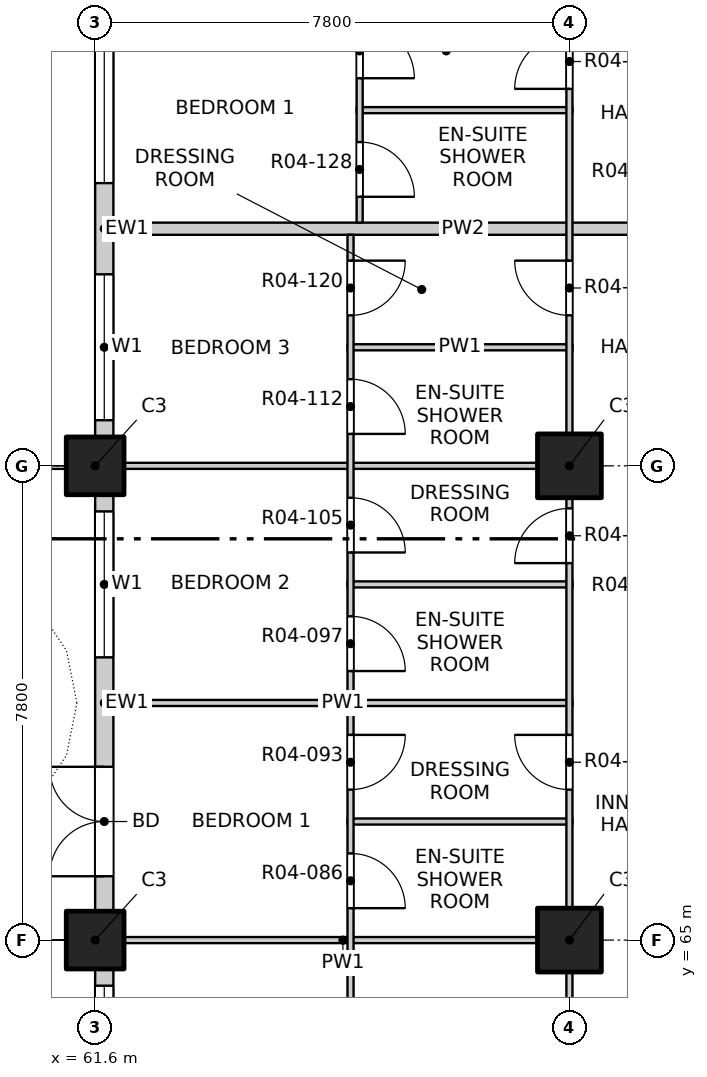
"""IFC4 building model, lengths in metres.
Left out: names, types, materials, properties, quantities, classifications, styles, units other than length and angle.
Written with IfcOpenShell. Run it as: python <this file> out.ifc"""

import sys

from ifc_helpers import new_model, si_unit, direction, frame, frame_2d, origin, origin_2d, place, context, subcontext, project, spatial, rectangle, extrude, element, fill, save


model = new_model("IFC4")
c1 = context("Model", 3, precision=1e-05, world=origin(), true_north=direction((0.0, 1.0)))
c2 = subcontext(c1, "Body", "Model", "MODEL_VIEW")
j1 = project(units=[si_unit("LENGTHUNIT", "METRE"), si_unit("PLANEANGLEUNIT", "RADIAN")], contexts=[c1])
p1 = place(None, origin())
s1 = spatial("IfcSite", under=j1, at=p1, CompositionType="ELEMENT")
p2 = place(p1, origin())
s2 = spatial("IfcBuilding", under=s1, at=p2, CompositionType="ELEMENT")
p3 = place(p2, frame((0.0, 0.0, 58.0)))
s3 = spatial("IfcBuildingStorey", under=s2, at=p3, CompositionType="ELEMENT", Elevation=58.0)
for number, where, z_axis, x_axis in (
    (1, (61.6, 65.0, -0.25), (0.0, 0.0, 1.0), (1.0, 0.0, 0.0)),
    (2, (61.6, 72.8, -0.25), (0.0, 0.0, 1.0), (1.0, 0.0, 0.0)),
):
    element("IfcColumn", number, at=place(p3, frame(where, z_axis=z_axis, x_axis=x_axis)), inside=s3, PredefinedType="COLUMN", context=c2, shape_type="SweptSolid", body=[
        extrude(rectangle(XDim=0.95, YDim=0.95, at=origin_2d()), origin(), (0.0, 0.0, 1.0), 3.4),
    ])
for number, where, z_axis, x_axis in (
    (3, (69.4, 65.0, -0.25), (0.0, 0.0, 1.0), (1.0, 0.0, 0.0)),
    (4, (69.4, 72.8, -0.25), (0.0, 0.0, 1.0), (1.0, 0.0, 0.0)),
):
    element("IfcColumn", number, at=place(p3, frame(where, z_axis=z_axis, x_axis=x_axis)), inside=s3, PredefinedType="COLUMN", context=c2, shape_type="SweptSolid", body=[
        extrude(rectangle(XDim=1.05, YDim=1.05, at=origin_2d()), origin(), (0.0, 0.0, 1.0), 3.4),
    ])
p4 = place(p3, frame((61.75, 57.675, 0.0), z_axis=(0.0, 0.0, 1.0), x_axis=(0.0, 1.0, 0.0)))
e5 = element("IfcWall", 5, at=p4, inside=s3, PredefinedType="SOLIDWALL", context=c2, shape_type="SweptSolid", body=[
    extrude(rectangle(XDim=6.85, YDim=0.3, at=frame_2d((3.425, 0.0))), origin(), (0.0, 0.0, 1.0), 2.7),
])
p5 = place(p4, frame((0.575, 0.0, 0.0)))
e6 = element("IfcOpeningElement", 6, at=p5, cuts=e5, PredefinedType="OPENING", context=c2, shape_type="SweptSolid", body=[
    extrude(rectangle(XDim=1.8, YDim=2.4, at=frame_2d((0.9, 1.2))), frame((0.0, 0.16, 0.0), z_axis=(0.0, -1.0, 0.0), x_axis=(1.0, 0.0, 0.0)), (0.0, 0.0, 1.0), 0.32),
])
p6 = place(p4, frame((4.175, 0.0, 0.9)))
e7 = element("IfcOpeningElement", 7, at=p6, cuts=e5, PredefinedType="OPENING", context=c2, shape_type="SweptSolid", body=[
    extrude(rectangle(XDim=2.4, YDim=1.8, at=frame_2d((1.2, 0.9))), frame((0.0, 0.16, 0.0), z_axis=(0.0, -1.0, 0.0), x_axis=(1.0, 0.0, 0.0)), (0.0, 0.0, 1.0), 0.32),
])
p7 = place(p3, frame((61.75, 65.475, 0.0), z_axis=(0.0, 0.0, 1.0), x_axis=(0.0, 1.0, 0.0)))
e8 = element("IfcWall", 8, at=p7, inside=s3, PredefinedType="SOLIDWALL", context=c2, shape_type="SweptSolid", body=[
    extrude(rectangle(XDim=6.85, YDim=0.3, at=frame_2d((3.425, 0.0))), origin(), (0.0, 0.0, 1.0), 2.7),
])
p8 = place(p7, frame((0.575, 0.0, 0.0)))
e9 = element("IfcOpeningElement", 9, at=p8, cuts=e8, PredefinedType="OPENING", context=c2, shape_type="SweptSolid", body=[
    extrude(rectangle(XDim=1.8, YDim=2.4, at=frame_2d((0.9, 1.2))), frame((0.0, 0.16, 0.0), z_axis=(0.0, -1.0, 0.0), x_axis=(1.0, 0.0, 0.0)), (0.0, 0.0, 1.0), 0.32),
])
p9 = place(p7, frame((4.175, 0.0, 0.9)))
e10 = element("IfcOpeningElement", 10, at=p9, cuts=e8, PredefinedType="OPENING", context=c2, shape_type="SweptSolid", body=[
    extrude(rectangle(XDim=2.4, YDim=1.8, at=frame_2d((1.2, 0.9))), frame((0.0, 0.16, 0.0), z_axis=(0.0, -1.0, 0.0), x_axis=(1.0, 0.0, 0.0)), (0.0, 0.0, 1.0), 0.32),
])
p10 = place(p3, frame((61.75, 73.275, 0.0), z_axis=(0.0, 0.0, 1.0), x_axis=(0.0, 1.0, 0.0)))
e11 = element("IfcWall", 11, at=p10, inside=s3, PredefinedType="SOLIDWALL", context=c2, shape_type="SweptSolid", body=[
    extrude(rectangle(XDim=6.85, YDim=0.3, at=frame_2d((3.425, 0.0))), origin(), (0.0, 0.0, 1.0), 2.7),
])
p11 = place(p10, frame((0.275, 0.0, 0.9)))
e12 = element("IfcOpeningElement", 12, at=p11, cuts=e11, PredefinedType="OPENING", context=c2, shape_type="SweptSolid", body=[
    extrude(rectangle(XDim=2.4, YDim=1.8, at=frame_2d((1.2, 0.9))), frame((0.0, 0.16, 0.0), z_axis=(0.0, -1.0, 0.0), x_axis=(1.0, 0.0, 0.0)), (0.0, 0.0, 1.0), 0.32),
])
p12 = place(p10, frame((4.175, 0.0, 0.9)))
e13 = element("IfcOpeningElement", 13, at=p12, cuts=e11, PredefinedType="OPENING", context=c2, shape_type="SweptSolid", body=[
    extrude(rectangle(XDim=2.4, YDim=1.8, at=frame_2d((1.2, 0.9))), frame((0.0, 0.16, 0.0), z_axis=(0.0, -1.0, 0.0), x_axis=(1.0, 0.0, 0.0)), (0.0, 0.0, 1.0), 0.32),
])
p13 = place(p3, frame((61.9, 65.0, 0.0), z_axis=(0.0, 0.0, 1.0), x_axis=(1.0, 0.0, 0.0)))
e14 = element("IfcWall", 14, at=p13, inside=s3, PredefinedType="PARTITIONING", context=c2, shape_type="SweptSolid", body=[
    extrude(rectangle(XDim=7.55, YDim=0.1, at=frame_2d((3.775, 0.0))), origin(), (0.0, 0.0, 1.0), 2.55),
])
p14 = place(p3, frame((65.75, 66.95, 0.0), z_axis=(0.0, 0.0, 1.0), x_axis=(1.0, 0.0, 0.0)))
e15 = element("IfcWall", 15, at=p14, inside=s3, PredefinedType="PARTITIONING", context=c2, shape_type="SweptSolid", body=[
    extrude(rectangle(XDim=3.7, YDim=0.1, at=frame_2d((1.85, 0.0))), origin(), (0.0, 0.0, 1.0), 3.15),
])
p15 = place(p3, frame((61.9, 68.9, 0.0), z_axis=(0.0, 0.0, 1.0), x_axis=(1.0, 0.0, 0.0)))
e16 = element("IfcWall", 16, at=p15, inside=s3, PredefinedType="PARTITIONING", context=c2, shape_type="SweptSolid", body=[
    extrude(rectangle(XDim=7.55, YDim=0.1, at=frame_2d((3.775, 0.0))), origin(), (0.0, 0.0, 1.0), 3.15),
])
p16 = place(p3, frame((65.75, 70.85, 0.0), z_axis=(0.0, 0.0, 1.0), x_axis=(1.0, 0.0, 0.0)))
e17 = element("IfcWall", 17, at=p16, inside=s3, PredefinedType="PARTITIONING", context=c2, shape_type="SweptSolid", body=[
    extrude(rectangle(XDim=3.7, YDim=0.1, at=frame_2d((1.85, 0.0))), origin(), (0.0, 0.0, 1.0), 3.15),
])
p17 = place(p3, frame((61.9, 72.8, 0.0), z_axis=(0.0, 0.0, 1.0), x_axis=(1.0, 0.0, 0.0)))
e18 = element("IfcWall", 18, at=p17, inside=s3, PredefinedType="PARTITIONING", context=c2, shape_type="SweptSolid", body=[
    extrude(rectangle(XDim=7.55, YDim=0.1, at=frame_2d((3.775, 0.0))), origin(), (0.0, 0.0, 1.0), 2.55),
])
p18 = place(p3, frame((65.75, 74.75, 0.0), z_axis=(0.0, 0.0, 1.0), x_axis=(1.0, 0.0, 0.0)))
e19 = element("IfcWall", 19, at=p18, inside=s3, PredefinedType="PARTITIONING", context=c2, shape_type="SweptSolid", body=[
    extrude(rectangle(XDim=3.7, YDim=0.1, at=frame_2d((1.85, 0.0))), origin(), (0.0, 0.0, 1.0), 3.15),
])
p19 = place(p3, frame((61.9, 76.7, 0.0), z_axis=(0.0, 0.0, 1.0), x_axis=(1.0, 0.0, 0.0)))
e20 = element("IfcWall", 20, at=p19, inside=s3, PredefinedType="PARTITIONING", context=c2, shape_type="SweptSolid", body=[
    extrude(rectangle(XDim=11.5, YDim=0.2, at=frame_2d((5.75, 0.0))), origin(), (0.0, 0.0, 1.0), 3.15),
])
p20 = place(p3, frame((65.9, 78.65, 0.0), z_axis=(0.0, 0.0, 1.0), x_axis=(1.0, 0.0, 0.0)))
e21 = element("IfcWall", 21, at=p20, inside=s3, PredefinedType="PARTITIONING", context=c2, shape_type="SweptSolid", body=[
    extrude(rectangle(XDim=3.55, YDim=0.1, at=frame_2d((1.775, 0.0))), origin(), (0.0, 0.0, 1.0), 3.15),
])
p21 = place(p3, frame((65.8, 61.2, 0.0), z_axis=(0.0, 0.0, 1.0), x_axis=(0.0, 1.0, 0.0)))
e22 = element("IfcWall", 22, at=p21, inside=s3, PredefinedType="PARTITIONING", context=c2, shape_type="SweptSolid", body=[
    extrude(rectangle(XDim=15.4, YDim=0.1, at=frame_2d((7.7, 0.0))), origin(), (0.0, 0.0, 1.0), 3.15),
])
p22 = place(p21, frame((1.25, 0.0, 0.0)))
e23 = element("IfcOpeningElement", 23, at=p22, cuts=e22, PredefinedType="OPENING", context=c2, shape_type="SweptSolid", body=[
    extrude(rectangle(XDim=1.2, YDim=2.1, at=frame_2d((0.6, 1.05))), frame((0.0, 0.06, 0.0), z_axis=(0.0, -1.0, 0.0), x_axis=(1.0, 0.0, 0.0)), (0.0, 0.0, 1.0), 0.12),
])
p23 = place(p21, frame((4.325, 0.0, 0.0)))
e24 = element("IfcOpeningElement", 24, at=p23, cuts=e22, PredefinedType="OPENING", context=c2, shape_type="SweptSolid", body=[
    extrude(rectangle(XDim=0.9, YDim=2.1, at=frame_2d((0.45, 1.05))), frame((0.0, 0.06, 0.0), z_axis=(0.0, -1.0, 0.0), x_axis=(1.0, 0.0, 0.0)), (0.0, 0.0, 1.0), 0.12),
])
p24 = place(p21, frame((6.275, 0.0, 0.0)))
e25 = element("IfcOpeningElement", 25, at=p24, cuts=e22, PredefinedType="OPENING", context=c2, shape_type="SweptSolid", body=[
    extrude(rectangle(XDim=0.9, YDim=2.1, at=frame_2d((0.45, 1.05))), frame((0.0, 0.06, 0.0), z_axis=(0.0, -1.0, 0.0), x_axis=(1.0, 0.0, 0.0)), (0.0, 0.0, 1.0), 0.12),
])
p25 = place(p21, frame((8.225, 0.0, 0.0)))
e26 = element("IfcOpeningElement", 26, at=p25, cuts=e22, PredefinedType="OPENING", context=c2, shape_type="SweptSolid", body=[
    extrude(rectangle(XDim=0.9, YDim=2.1, at=frame_2d((0.45, 1.05))), frame((0.0, 0.06, 0.0), z_axis=(0.0, -1.0, 0.0), x_axis=(1.0, 0.0, 0.0)), (0.0, 0.0, 1.0), 0.12),
])
p26 = place(p21, frame((10.175, 0.0, 0.0)))
e27 = element("IfcOpeningElement", 27, at=p26, cuts=e22, PredefinedType="OPENING", context=c2, shape_type="SweptSolid", body=[
    extrude(rectangle(XDim=0.9, YDim=2.1, at=frame_2d((0.45, 1.05))), frame((0.0, 0.06, 0.0), z_axis=(0.0, -1.0, 0.0), x_axis=(1.0, 0.0, 0.0)), (0.0, 0.0, 1.0), 0.12),
])
p27 = place(p21, frame((12.125, 0.0, 0.0)))
e28 = element("IfcOpeningElement", 28, at=p27, cuts=e22, PredefinedType="OPENING", context=c2, shape_type="SweptSolid", body=[
    extrude(rectangle(XDim=0.9, YDim=2.1, at=frame_2d((0.45, 1.05))), frame((0.0, 0.06, 0.0), z_axis=(0.0, -1.0, 0.0), x_axis=(1.0, 0.0, 0.0)), (0.0, 0.0, 1.0), 0.12),
])
p28 = place(p21, frame((14.075, 0.0, 0.0)))
e29 = element("IfcOpeningElement", 29, at=p28, cuts=e22, PredefinedType="OPENING", context=c2, shape_type="SweptSolid", body=[
    extrude(rectangle(XDim=0.9, YDim=2.1, at=frame_2d((0.45, 1.05))), frame((0.0, 0.06, 0.0), z_axis=(0.0, -1.0, 0.0), x_axis=(1.0, 0.0, 0.0)), (0.0, 0.0, 1.0), 0.12),
])
p29 = place(p3, frame((65.95, 76.8, 0.0), z_axis=(0.0, 0.0, 1.0), x_axis=(0.0, 1.0, 0.0)))
e30 = element("IfcWall", 30, at=p29, inside=s3, PredefinedType="PARTITIONING", context=c2, shape_type="SweptSolid", body=[
    extrude(rectangle(XDim=11.3, YDim=0.1, at=frame_2d((5.65, 0.0))), origin(), (0.0, 0.0, 1.0), 3.15),
])
p30 = place(p29, frame((0.425, 0.0, 0.0)))
e31 = element("IfcOpeningElement", 31, at=p30, cuts=e30, PredefinedType="OPENING", context=c2, shape_type="SweptSolid", body=[
    extrude(rectangle(XDim=0.9, YDim=2.1, at=frame_2d((0.45, 1.05))), frame((0.0, 0.06, 0.0), z_axis=(0.0, -1.0, 0.0), x_axis=(1.0, 0.0, 0.0)), (0.0, 0.0, 1.0), 0.12),
])
p31 = place(p29, frame((2.375, 0.0, 0.0)))
e32 = element("IfcOpeningElement", 32, at=p31, cuts=e30, PredefinedType="OPENING", context=c2, shape_type="SweptSolid", body=[
    extrude(rectangle(XDim=0.9, YDim=2.1, at=frame_2d((0.45, 1.05))), frame((0.0, 0.06, 0.0), z_axis=(0.0, -1.0, 0.0), x_axis=(1.0, 0.0, 0.0)), (0.0, 0.0, 1.0), 0.12),
])
p32 = place(p29, frame((5.15, 0.0, 0.0)))
e33 = element("IfcOpeningElement", 33, at=p32, cuts=e30, PredefinedType="OPENING", context=c2, shape_type="SweptSolid", body=[
    extrude(rectangle(XDim=1.2, YDim=2.1, at=frame_2d((0.6, 1.05))), frame((0.0, 0.06, 0.0), z_axis=(0.0, -1.0, 0.0), x_axis=(1.0, 0.0, 0.0)), (0.0, 0.0, 1.0), 0.12),
])
p33 = place(p29, frame((9.05, 0.0, 0.0)))
e34 = element("IfcOpeningElement", 34, at=p33, cuts=e30, PredefinedType="OPENING", context=c2, shape_type="SweptSolid", body=[
    extrude(rectangle(XDim=1.2, YDim=2.1, at=frame_2d((0.6, 1.05))), frame((0.0, 0.06, 0.0), z_axis=(0.0, -1.0, 0.0), x_axis=(1.0, 0.0, 0.0)), (0.0, 0.0, 1.0), 0.12),
])
p34 = place(p3, frame((69.4, 49.4, 0.0), z_axis=(0.0, 0.0, 1.0), x_axis=(0.0, 1.0, 0.0)))
e35 = element("IfcWall", 35, at=p34, inside=s3, PredefinedType="PARTITIONING", context=c2, shape_type="SweptSolid", body=[
    extrude(rectangle(XDim=31.2, YDim=0.1, at=frame_2d((15.6, 0.0))), origin(), (0.0, 0.0, 1.0), 3.15),
])
p35 = place(p34, frame((2.475, 0.0, 0.0)))
e36 = element("IfcOpeningElement", 36, at=p35, cuts=e35, PredefinedType="OPENING", context=c2, shape_type="SweptSolid", body=[
    extrude(rectangle(XDim=0.9, YDim=2.1, at=frame_2d((0.45, 1.05))), frame((0.0, 0.06, 0.0), z_axis=(0.0, -1.0, 0.0), x_axis=(1.0, 0.0, 0.0)), (0.0, 0.0, 1.0), 0.12),
])
p36 = place(p34, frame((5.4, 0.0, 0.0)))
e37 = element("IfcOpeningElement", 37, at=p36, cuts=e35, PredefinedType="OPENING", context=c2, shape_type="SweptSolid", body=[
    extrude(rectangle(XDim=0.9, YDim=2.1, at=frame_2d((0.45, 1.05))), frame((0.0, 0.06, 0.0), z_axis=(0.0, -1.0, 0.0), x_axis=(1.0, 0.0, 0.0)), (0.0, 0.0, 1.0), 0.12),
])
p37 = place(p34, frame((10.275, 0.0, 0.0)))
e38 = element("IfcOpeningElement", 38, at=p37, cuts=e35, PredefinedType="OPENING", context=c2, shape_type="SweptSolid", body=[
    extrude(rectangle(XDim=0.9, YDim=2.1, at=frame_2d((0.45, 1.05))), frame((0.0, 0.06, 0.0), z_axis=(0.0, -1.0, 0.0), x_axis=(1.0, 0.0, 0.0)), (0.0, 0.0, 1.0), 0.12),
])
p38 = place(p34, frame((13.2, 0.0, 0.0)))
e39 = element("IfcOpeningElement", 39, at=p38, cuts=e35, PredefinedType="OPENING", context=c2, shape_type="SweptSolid", body=[
    extrude(rectangle(XDim=0.9, YDim=2.1, at=frame_2d((0.45, 1.05))), frame((0.0, 0.06, 0.0), z_axis=(0.0, -1.0, 0.0), x_axis=(1.0, 0.0, 0.0)), (0.0, 0.0, 1.0), 0.12),
])
p39 = place(p34, frame((18.075, 0.0, 0.0)))
e40 = element("IfcOpeningElement", 40, at=p39, cuts=e35, PredefinedType="OPENING", context=c2, shape_type="SweptSolid", body=[
    extrude(rectangle(XDim=0.9, YDim=2.1, at=frame_2d((0.45, 1.05))), frame((0.0, 0.06, 0.0), z_axis=(0.0, -1.0, 0.0), x_axis=(1.0, 0.0, 0.0)), (0.0, 0.0, 1.0), 0.12),
])
p40 = place(p34, frame((21.8, 0.0, 0.0)))
e41 = element("IfcOpeningElement", 41, at=p40, cuts=e35, PredefinedType="OPENING", context=c2, shape_type="SweptSolid", body=[
    extrude(rectangle(XDim=0.9, YDim=2.1, at=frame_2d((0.45, 1.05))), frame((0.0, 0.06, 0.0), z_axis=(0.0, -1.0, 0.0), x_axis=(1.0, 0.0, 0.0)), (0.0, 0.0, 1.0), 0.12),
])
p41 = place(p34, frame((25.875, 0.0, 0.0)))
e42 = element("IfcOpeningElement", 42, at=p41, cuts=e35, PredefinedType="OPENING", context=c2, shape_type="SweptSolid", body=[
    extrude(rectangle(XDim=0.9, YDim=2.1, at=frame_2d((0.45, 1.05))), frame((0.0, 0.06, 0.0), z_axis=(0.0, -1.0, 0.0), x_axis=(1.0, 0.0, 0.0)), (0.0, 0.0, 1.0), 0.12),
])
p42 = place(p34, frame((29.6, 0.0, 0.0)))
e43 = element("IfcOpeningElement", 43, at=p42, cuts=e35, PredefinedType="OPENING", context=c2, shape_type="SweptSolid", body=[
    extrude(rectangle(XDim=0.9, YDim=2.1, at=frame_2d((0.45, 1.05))), frame((0.0, 0.06, 0.0), z_axis=(0.0, -1.0, 0.0), x_axis=(1.0, 0.0, 0.0)), (0.0, 0.0, 1.0), 0.12),
])
p43 = place(p6, origin())
e44 = element("IfcWindow", 44, at=p43, inside=s3, PartitioningType="DOUBLE_PANEL_VERTICAL", PredefinedType="WINDOW", context=c2, shape_type="SweptSolid", body=[
    extrude(rectangle(XDim=2.4, YDim=1.8, at=frame_2d((1.2, 0.9))), frame((0.0, 0.03, 0.0), z_axis=(0.0, -1.0, 0.0), x_axis=(1.0, 0.0, 0.0)), (0.0, 0.0, 1.0), 0.06),
])
fill(e7, e44)
p44 = place(p8, origin())
e45 = element("IfcDoor", 45, at=p44, inside=s3, OperationType="DOUBLE_DOOR_SINGLE_SWING", PredefinedType="DOOR", context=c2, shape_type="SweptSolid", body=[
    extrude(rectangle(XDim=1.8, YDim=2.4, at=frame_2d((0.9, 1.2))), frame((0.0, 0.025, 0.0), z_axis=(0.0, -1.0, 0.0), x_axis=(1.0, 0.0, 0.0)), (0.0, 0.0, 1.0), 0.05),
])
fill(e9, e45)
p45 = place(p9, origin())
e46 = element("IfcWindow", 46, at=p45, inside=s3, PartitioningType="DOUBLE_PANEL_VERTICAL", PredefinedType="WINDOW", context=c2, shape_type="SweptSolid", body=[
    extrude(rectangle(XDim=2.4, YDim=1.8, at=frame_2d((1.2, 0.9))), frame((0.0, 0.03, 0.0), z_axis=(0.0, -1.0, 0.0), x_axis=(1.0, 0.0, 0.0)), (0.0, 0.0, 1.0), 0.06),
])
fill(e10, e46)
p46 = place(p11, origin())
e47 = element("IfcWindow", 47, at=p46, inside=s3, PartitioningType="DOUBLE_PANEL_VERTICAL", PredefinedType="WINDOW", context=c2, shape_type="SweptSolid", body=[
    extrude(rectangle(XDim=2.4, YDim=1.8, at=frame_2d((1.2, 0.9))), frame((0.0, 0.03, 0.0), z_axis=(0.0, -1.0, 0.0), x_axis=(1.0, 0.0, 0.0)), (0.0, 0.0, 1.0), 0.06),
])
fill(e12, e47)
p47 = place(p12, origin())
e48 = element("IfcWindow", 48, at=p47, inside=s3, PartitioningType="DOUBLE_PANEL_VERTICAL", PredefinedType="WINDOW", context=c2, shape_type="SweptSolid", body=[
    extrude(rectangle(XDim=2.4, YDim=1.8, at=frame_2d((1.2, 0.9))), frame((0.0, 0.03, 0.0), z_axis=(0.0, -1.0, 0.0), x_axis=(1.0, 0.0, 0.0)), (0.0, 0.0, 1.0), 0.06),
])
fill(e13, e48)
p48 = place(p23, origin())
e49 = element("IfcDoor", 49, at=p48, inside=s3, OperationType="SINGLE_SWING_RIGHT", PredefinedType="DOOR", context=c2, shape_type="SweptSolid", body=[
    extrude(rectangle(XDim=0.9, YDim=2.1, at=frame_2d((0.45, 1.05))), frame((0.0, 0.025, 0.0), z_axis=(0.0, -1.0, 0.0), x_axis=(1.0, 0.0, 0.0)), (0.0, 0.0, 1.0), 0.05),
])
fill(e24, e49)
p49 = place(p24, origin())
e50 = element("IfcDoor", 50, at=p49, inside=s3, OperationType="SINGLE_SWING_LEFT", PredefinedType="DOOR", context=c2, shape_type="SweptSolid", body=[
    extrude(rectangle(XDim=0.9, YDim=2.1, at=frame_2d((0.45, 1.05))), frame((0.0, 0.025, 0.0), z_axis=(0.0, -1.0, 0.0), x_axis=(1.0, 0.0, 0.0)), (0.0, 0.0, 1.0), 0.05),
])
fill(e25, e50)
p50 = place(p39, origin())
e51 = element("IfcDoor", 51, at=p50, inside=s3, OperationType="SINGLE_SWING_RIGHT", PredefinedType="DOOR", context=c2, shape_type="SweptSolid", body=[
    extrude(rectangle(XDim=0.9, YDim=2.1, at=frame_2d((0.45, 1.05))), frame((0.0, 0.025, 0.0), z_axis=(0.0, -1.0, 0.0), x_axis=(1.0, 0.0, 0.0)), (0.0, 0.0, 1.0), 0.05),
])
fill(e40, e51)
p51 = place(p25, origin())
e52 = element("IfcDoor", 52, at=p51, inside=s3, OperationType="SINGLE_SWING_RIGHT", PredefinedType="DOOR", context=c2, shape_type="SweptSolid", body=[
    extrude(rectangle(XDim=0.9, YDim=2.1, at=frame_2d((0.45, 1.05))), frame((0.0, 0.025, 0.0), z_axis=(0.0, -1.0, 0.0), x_axis=(1.0, 0.0, 0.0)), (0.0, 0.0, 1.0), 0.05),
])
fill(e26, e52)
p52 = place(p40, origin())
e53 = element("IfcDoor", 53, at=p52, inside=s3, OperationType="SINGLE_SWING_LEFT", PredefinedType="DOOR", context=c2, shape_type="SweptSolid", body=[
    extrude(rectangle(XDim=0.9, YDim=2.1, at=frame_2d((0.45, 1.05))), frame((0.0, 0.025, 0.0), z_axis=(0.0, -1.0, 0.0), x_axis=(1.0, 0.0, 0.0)), (0.0, 0.0, 1.0), 0.05),
])
fill(e41, e53)
p53 = place(p26, origin())
e54 = element("IfcDoor", 54, at=p53, inside=s3, OperationType="SINGLE_SWING_RIGHT", PredefinedType="DOOR", context=c2, shape_type="SweptSolid", body=[
    extrude(rectangle(XDim=0.9, YDim=2.1, at=frame_2d((0.45, 1.05))), frame((0.0, 0.025, 0.0), z_axis=(0.0, -1.0, 0.0), x_axis=(1.0, 0.0, 0.0)), (0.0, 0.0, 1.0), 0.05),
])
fill(e27, e54)
p54 = place(p27, origin())
e55 = element("IfcDoor", 55, at=p54, inside=s3, OperationType="SINGLE_SWING_RIGHT", PredefinedType="DOOR", context=c2, shape_type="SweptSolid", body=[
    extrude(rectangle(XDim=0.9, YDim=2.1, at=frame_2d((0.45, 1.05))), frame((0.0, 0.025, 0.0), z_axis=(0.0, -1.0, 0.0), x_axis=(1.0, 0.0, 0.0)), (0.0, 0.0, 1.0), 0.05),
])
fill(e28, e55)
p55 = place(p28, origin())
e56 = element("IfcDoor", 56, at=p55, inside=s3, OperationType="SINGLE_SWING_LEFT", PredefinedType="DOOR", context=c2, shape_type="SweptSolid", body=[
    extrude(rectangle(XDim=0.9, YDim=2.1, at=frame_2d((0.45, 1.05))), frame((0.0, 0.025, 0.0), z_axis=(0.0, -1.0, 0.0), x_axis=(1.0, 0.0, 0.0)), (0.0, 0.0, 1.0), 0.05),
])
fill(e29, e56)
p56 = place(p41, origin())
e57 = element("IfcDoor", 57, at=p56, inside=s3, OperationType="SINGLE_SWING_RIGHT", PredefinedType="DOOR", context=c2, shape_type="SweptSolid", body=[
    extrude(rectangle(XDim=0.9, YDim=2.1, at=frame_2d((0.45, 1.05))), frame((0.0, 0.025, 0.0), z_axis=(0.0, -1.0, 0.0), x_axis=(1.0, 0.0, 0.0)), (0.0, 0.0, 1.0), 0.05),
])
fill(e42, e57)
p57 = place(p30, origin())
e58 = element("IfcDoor", 58, at=p57, inside=s3, OperationType="SINGLE_SWING_RIGHT", PredefinedType="DOOR", context=c2, shape_type="SweptSolid", body=[
    extrude(rectangle(XDim=0.9, YDim=2.1, at=frame_2d((0.45, 1.05))), frame((0.0, 0.025, 0.0), z_axis=(0.0, -1.0, 0.0), x_axis=(1.0, 0.0, 0.0)), (0.0, 0.0, 1.0), 0.05),
])
fill(e31, e58)
p58 = place(p42, origin())
e59 = element("IfcDoor", 59, at=p58, inside=s3, OperationType="SINGLE_SWING_LEFT", PredefinedType="DOOR", context=c2, shape_type="SweptSolid", body=[
    extrude(rectangle(XDim=0.9, YDim=2.1, at=frame_2d((0.45, 1.05))), frame((0.0, 0.025, 0.0), z_axis=(0.0, -1.0, 0.0), x_axis=(1.0, 0.0, 0.0)), (0.0, 0.0, 1.0), 0.05),
])
fill(e43, e59)
p59 = place(p31, origin())
e60 = element("IfcDoor", 60, at=p59, inside=s3, OperationType="SINGLE_SWING_RIGHT", PredefinedType="DOOR", context=c2, shape_type="SweptSolid", body=[
    extrude(rectangle(XDim=0.9, YDim=2.1, at=frame_2d((0.45, 1.05))), frame((0.0, 0.025, 0.0), z_axis=(0.0, -1.0, 0.0), x_axis=(1.0, 0.0, 0.0)), (0.0, 0.0, 1.0), 0.05),
])
fill(e32, e60)
save(model, sys.argv[1])
